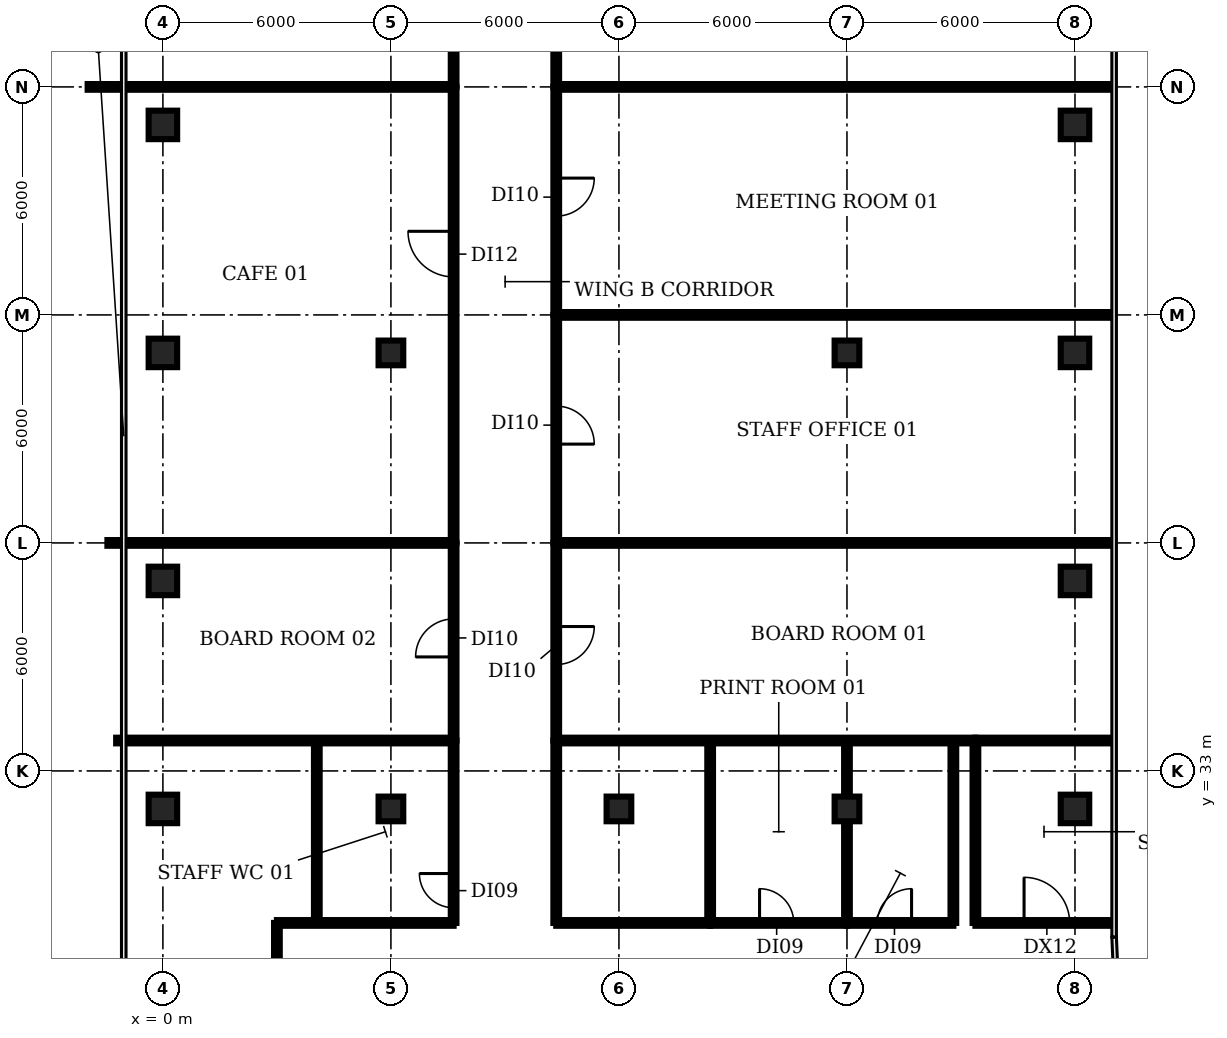
"""IFC4 building model, lengths in metres.
Left out: names, types, materials, properties, quantities, classifications, styles, units other than length and angle.
Written with IfcOpenShell. Run it as: python <this file> out.ifc"""

import sys

from ifc_helpers import new_model, si_unit, direction, frame, frame_2d, origin, origin_2d, place, context, subcontext, project, spatial, rectangle, extrude, element, fill, save


model = new_model("IFC4")
c1 = context("Model", 3, precision=1e-05, world=origin(), true_north=direction((0.0, 1.0)))
c2 = subcontext(c1, "Body", "Model", "MODEL_VIEW")
j1 = project(units=[si_unit("LENGTHUNIT", "METRE"), si_unit("PLANEANGLEUNIT", "RADIAN")], contexts=[c1])
p1 = place(None, origin())
s1 = spatial("IfcSite", under=j1, at=p1, CompositionType="ELEMENT")
p2 = place(p1, origin())
s2 = spatial("IfcBuilding", under=s1, at=p2, CompositionType="ELEMENT")
p3 = place(p2, frame((0.0, 0.0, 297.8)))
s3 = spatial("IfcBuildingStorey", under=s2, at=p3, CompositionType="ELEMENT", Elevation=297.8)
for number, where, z_axis, x_axis in (
    (1, (0.0, 32.0, 0.0), (0.0, 0.0, 1.0), (1.0, 0.0, 0.0)),
    (2, (0.0, 38.0, 0.0), (0.0, 0.0, 1.0), (1.0, 0.0, 0.0)),
    (3, (0.0, 44.0, 0.0), (0.0, 0.0, 1.0), (1.0, 0.0, 0.0)),
    (4, (0.0, 50.0, 0.0), (0.0, 0.0, 1.0), (1.0, 0.0, 0.0)),
):
    element("IfcColumn", number, at=place(p3, frame(where, z_axis=z_axis, x_axis=x_axis)), inside=s3, PredefinedType="COLUMN", context=c2, shape_type="SweptSolid", body=[
        extrude(rectangle(XDim=0.75, YDim=0.75, at=origin_2d()), origin(), (0.0, 0.0, 1.0), 3.85),
    ])
for number, where, z_axis, x_axis in (
    (5, (6.0, 32.0, 0.0), (0.0, 0.0, 1.0), (1.0, 0.0, 0.0)),
    (6, (6.0, 44.0, 0.0), (0.0, 0.0, 1.0), (1.0, 0.0, 0.0)),
    (7, (12.0, 32.0, 0.0), (0.0, 0.0, 1.0), (1.0, 0.0, 0.0)),
    (8, (18.0, 32.0, 0.0), (0.0, 0.0, 1.0), (1.0, 0.0, 0.0)),
    (9, (18.0, 44.0, 0.0), (0.0, 0.0, 1.0), (1.0, 0.0, 0.0)),
):
    element("IfcColumn", number, at=place(p3, frame(where, z_axis=z_axis, x_axis=x_axis)), inside=s3, PredefinedType="COLUMN", context=c2, shape_type="SweptSolid", body=[
        extrude(rectangle(XDim=0.65, YDim=0.65, at=origin_2d()), origin(), (0.0, 0.0, 1.0), 3.85),
    ])
for number, where, z_axis, x_axis in (
    (10, (24.0, 32.0, 0.0), (0.0, 0.0, 1.0), (1.0, 0.0, 0.0)),
    (11, (24.0, 38.0, 0.0), (0.0, 0.0, 1.0), (1.0, 0.0, 0.0)),
    (12, (24.0, 44.0, 0.0), (0.0, 0.0, 1.0), (1.0, 0.0, 0.0)),
    (13, (24.0, 50.0, 0.0), (0.0, 0.0, 1.0), (1.0, 0.0, 0.0)),
):
    element("IfcColumn", number, at=place(p3, frame(where, z_axis=z_axis, x_axis=x_axis)), inside=s3, PredefinedType="COLUMN", context=c2, shape_type="SweptSolid", body=[
        extrude(rectangle(XDim=0.75, YDim=0.75, at=origin_2d()), origin(), (0.0, 0.0, 1.0), 3.85),
    ])
p4 = place(p3, frame((-1.98, 51.0, 0.0), z_axis=(0.0, 0.0, 1.0), x_axis=(1.0, 0.0, 0.0)))
e14 = element("IfcWall", 14, at=p4, inside=s3, PredefinedType="PARTITIONING", context=c2, shape_type="SweptSolid", body=[
    extrude(rectangle(XDim=9.63, YDim=0.15, at=frame_2d((4.815, 0.0))), origin(), (0.0, 0.0, 1.0), 2.9),
])
p5 = place(p3, frame((-1.46, 39.0, 0.0), z_axis=(0.0, 0.0, 1.0), x_axis=(1.0, 0.0, 0.0)))
e15 = element("IfcWall", 15, at=p5, inside=s3, PredefinedType="PARTITIONING", context=c2, shape_type="SweptSolid", body=[
    extrude(rectangle(XDim=9.11, YDim=0.15, at=frame_2d((4.555, 0.0))), origin(), (0.0, 0.0, 1.0), 2.9),
])
p6 = place(p3, frame((-1.23, 33.8, 0.0), z_axis=(0.0, 0.0, 1.0), x_axis=(1.0, 0.0, 0.0)))
e16 = element("IfcWall", 16, at=p6, inside=s3, PredefinedType="PARTITIONING", context=c2, shape_type="SweptSolid", body=[
    extrude(rectangle(XDim=8.88, YDim=0.15, at=frame_2d((4.44, 0.0))), origin(), (0.0, 0.0, 1.0), 2.9),
])
p7 = place(p3, frame((3.0, 25.1, 0.0), z_axis=(0.0, 0.0, 1.0), x_axis=(0.0, 1.0, 0.0)))
e17 = element("IfcWall", 17, at=p7, inside=s3, PredefinedType="PARTITIONING", context=c2, shape_type="SweptSolid", body=[
    extrude(rectangle(XDim=3.9, YDim=0.15, at=frame_2d((1.95, 0.0))), origin(), (0.0, 0.0, 1.0), 2.9),
])
p8 = place(p3, frame((3.0, 29.0, 0.0), z_axis=(0.0, 0.0, 1.0), x_axis=(1.0, 0.0, 0.0)))
e18 = element("IfcWall", 18, at=p8, inside=s3, PredefinedType="PARTITIONING", context=c2, shape_type="SweptSolid", body=[
    extrude(rectangle(XDim=4.65, YDim=0.15, at=frame_2d((2.325, 0.0))), origin(), (0.0, 0.0, 1.0), 2.9),
])
p9 = place(p3, frame((4.05, 29.0, 0.0), z_axis=(0.0, 0.0, 1.0), x_axis=(0.0, 1.0, 0.0)))
e19 = element("IfcWall", 19, at=p9, inside=s3, PredefinedType="PARTITIONING", context=c2, shape_type="SweptSolid", body=[
    extrude(rectangle(XDim=4.8, YDim=0.15, at=frame_2d((2.4, 0.0))), origin(), (0.0, 0.0, 1.0), 2.9),
])
p10 = place(p3, frame((7.65, 29.0, 0.0), z_axis=(0.0, 0.0, 1.0), x_axis=(0.0, 1.0, 0.0)))
e20 = element("IfcWall", 20, at=p10, inside=s3, PredefinedType="PARTITIONING", context=c2, shape_type="SweptSolid", body=[
    extrude(rectangle(XDim=4.8, YDim=0.15, at=frame_2d((2.4, 0.0))), origin(), (0.0, 0.0, 1.0), 2.9),
])
p11 = place(p10, frame((0.4, 0.0, 0.0)))
e21 = element("IfcOpeningElement", 21, at=p11, cuts=e20, PredefinedType="OPENING", context=c2, shape_type="SweptSolid", body=[
    extrude(rectangle(XDim=0.9, YDim=2.1, at=frame_2d((0.45, 1.05))), frame((0.0, 0.085, 0.0), z_axis=(0.0, -1.0, 0.0), x_axis=(1.0, 0.0, 0.0)), (0.0, 0.0, 1.0), 0.17),
])
p12 = place(p3, frame((7.65, 33.8, 0.0), z_axis=(0.0, 0.0, 1.0), x_axis=(0.0, 1.0, 0.0)))
e22 = element("IfcWall", 22, at=p12, inside=s3, PredefinedType="PARTITIONING", context=c2, shape_type="SweptSolid", body=[
    extrude(rectangle(XDim=5.2, YDim=0.15, at=frame_2d((2.6, 0.0))), origin(), (0.0, 0.0, 1.0), 2.9),
])
p13 = place(p12, frame((2.2, 0.0, 0.0)))
e23 = element("IfcOpeningElement", 23, at=p13, cuts=e22, PredefinedType="OPENING", context=c2, shape_type="SweptSolid", body=[
    extrude(rectangle(XDim=1.0, YDim=2.1, at=frame_2d((0.5, 1.05))), frame((0.0, 0.085, 0.0), z_axis=(0.0, -1.0, 0.0), x_axis=(1.0, 0.0, 0.0)), (0.0, 0.0, 1.0), 0.17),
])
p14 = place(p3, frame((7.65, 39.0, 0.0), z_axis=(0.0, 0.0, 1.0), x_axis=(0.0, 1.0, 0.0)))
e24 = element("IfcWall", 24, at=p14, inside=s3, PredefinedType="PARTITIONING", context=c2, shape_type="SweptSolid", body=[
    extrude(rectangle(XDim=12.0, YDim=0.15, at=frame_2d((6.0, 0.0))), origin(), (0.0, 0.0, 1.0), 2.9),
])
p15 = place(p14, frame((7.0, 0.0, 0.0)))
e25 = element("IfcOpeningElement", 25, at=p15, cuts=e24, PredefinedType="OPENING", context=c2, shape_type="SweptSolid", body=[
    extrude(rectangle(XDim=1.2, YDim=2.1, at=frame_2d((0.6, 1.05))), frame((0.0, 0.085, 0.0), z_axis=(0.0, -1.0, 0.0), x_axis=(1.0, 0.0, 0.0)), (0.0, 0.0, 1.0), 0.17),
])
p16 = place(p3, frame((7.65, 51.0, 0.0), z_axis=(0.0, 0.0, 1.0), x_axis=(0.0, 1.0, 0.0)))
e26 = element("IfcWall", 26, at=p16, inside=s3, PredefinedType="PARTITIONING", context=c2, shape_type="SweptSolid", body=[
    extrude(rectangle(XDim=6.0, YDim=0.15, at=frame_2d((3.0, 0.0))), origin(), (0.0, 0.0, 1.0), 2.9),
])
p17 = place(p16, frame((1.8, 0.0, 0.0)))
e27 = element("IfcOpeningElement", 27, at=p17, cuts=e26, PredefinedType="OPENING", context=c2, shape_type="SweptSolid", body=[
    extrude(rectangle(XDim=1.0, YDim=2.1, at=frame_2d((0.5, 1.05))), frame((0.0, 0.085, 0.0), z_axis=(0.0, -1.0, 0.0), x_axis=(1.0, 0.0, 0.0)), (0.0, 0.0, 1.0), 0.17),
])
p18 = place(p3, frame((10.35, 29.0, 0.0), z_axis=(0.0, 0.0, 1.0), x_axis=(0.0, 1.0, 0.0)))
e28 = element("IfcWall", 28, at=p18, inside=s3, PredefinedType="PARTITIONING", context=c2, shape_type="SweptSolid", body=[
    extrude(rectangle(XDim=4.8, YDim=0.15, at=frame_2d((2.4, 0.0))), origin(), (0.0, 0.0, 1.0), 2.9),
])
p19 = place(p3, frame((10.35, 29.0, 0.0), z_axis=(0.0, 0.0, 1.0), x_axis=(1.0, 0.0, 0.0)))
e29 = element("IfcWall", 29, at=p19, inside=s3, PredefinedType="PARTITIONING", context=c2, shape_type="SweptSolid", body=[
    extrude(rectangle(XDim=4.05, YDim=0.15, at=frame_2d((2.025, 0.0))), origin(), (0.0, 0.0, 1.0), 2.9),
])
p20 = place(p3, frame((10.35, 33.8, 0.0), z_axis=(0.0, 0.0, 1.0), x_axis=(1.0, 0.0, 0.0)))
e30 = element("IfcWall", 30, at=p20, inside=s3, PredefinedType="PARTITIONING", context=c2, shape_type="SweptSolid", body=[
    extrude(rectangle(XDim=11.03, YDim=0.15, at=frame_2d((5.515, 0.0))), origin(), (0.0, 0.0, 1.0), 2.9),
])
p21 = place(p3, frame((10.35, 39.0, 0.0), z_axis=(0.0, 0.0, 1.0), x_axis=(0.0, -1.0, 0.0)))
e31 = element("IfcWall", 31, at=p21, inside=s3, PredefinedType="PARTITIONING", context=c2, shape_type="SweptSolid", body=[
    extrude(rectangle(XDim=5.2, YDim=0.15, at=frame_2d((2.6, 0.0))), origin(), (0.0, 0.0, 1.0), 2.9),
])
p22 = place(p21, frame((2.2, 0.0, 0.0)))
e32 = element("IfcOpeningElement", 32, at=p22, cuts=e31, PredefinedType="OPENING", context=c2, shape_type="SweptSolid", body=[
    extrude(rectangle(XDim=1.0, YDim=2.1, at=frame_2d((0.5, 1.05))), frame((0.0, 0.085, 0.0), z_axis=(0.0, -1.0, 0.0), x_axis=(1.0, 0.0, 0.0)), (0.0, 0.0, 1.0), 0.17),
])
p23 = place(p3, frame((10.35, 39.0, 0.0), z_axis=(0.0, 0.0, 1.0), x_axis=(1.0, 0.0, 0.0)))
e33 = element("IfcWall", 33, at=p23, inside=s3, PredefinedType="PARTITIONING", context=c2, shape_type="SweptSolid", body=[
    extrude(rectangle(XDim=14.63, YDim=0.15, at=frame_2d((7.315, 0.0))), origin(), (0.0, 0.0, 1.0), 2.9),
])
p24 = place(p3, frame((10.35, 45.0, 0.0), z_axis=(0.0, 0.0, 1.0), x_axis=(0.0, -1.0, 0.0)))
e34 = element("IfcWall", 34, at=p24, inside=s3, PredefinedType="PARTITIONING", context=c2, shape_type="SweptSolid", body=[
    extrude(rectangle(XDim=6.0, YDim=0.15, at=frame_2d((3.0, 0.0))), origin(), (0.0, 0.0, 1.0), 2.9),
])
p25 = place(p24, frame((2.4, 0.0, 0.0)))
e35 = element("IfcOpeningElement", 35, at=p25, cuts=e34, PredefinedType="OPENING", context=c2, shape_type="SweptSolid", body=[
    extrude(rectangle(XDim=1.0, YDim=2.1, at=frame_2d((0.5, 1.05))), frame((0.0, 0.085, 0.0), z_axis=(0.0, -1.0, 0.0), x_axis=(1.0, 0.0, 0.0)), (0.0, 0.0, 1.0), 0.17),
])
p26 = place(p3, frame((10.35, 45.0, 0.0), z_axis=(0.0, 0.0, 1.0), x_axis=(1.0, 0.0, 0.0)))
e36 = element("IfcWall", 36, at=p26, inside=s3, PredefinedType="PARTITIONING", context=c2, shape_type="SweptSolid", body=[
    extrude(rectangle(XDim=14.63, YDim=0.15, at=frame_2d((7.315, 0.0))), origin(), (0.0, 0.0, 1.0), 2.9),
])
p27 = place(p3, frame((10.35, 51.0, 0.0), z_axis=(0.0, 0.0, 1.0), x_axis=(0.0, -1.0, 0.0)))
e37 = element("IfcWall", 37, at=p27, inside=s3, PredefinedType="PARTITIONING", context=c2, shape_type="SweptSolid", body=[
    extrude(rectangle(XDim=6.0, YDim=0.15, at=frame_2d((3.0, 0.0))), origin(), (0.0, 0.0, 1.0), 2.9),
])
p28 = place(p27, frame((2.4, 0.0, 0.0)))
e38 = element("IfcOpeningElement", 38, at=p28, cuts=e37, PredefinedType="OPENING", context=c2, shape_type="SweptSolid", body=[
    extrude(rectangle(XDim=1.0, YDim=2.1, at=frame_2d((0.5, 1.05))), frame((0.0, 0.085, 0.0), z_axis=(0.0, -1.0, 0.0), x_axis=(1.0, 0.0, 0.0)), (0.0, 0.0, 1.0), 0.17),
])
p29 = place(p3, frame((10.35, 51.0, 0.0), z_axis=(0.0, 0.0, 1.0), x_axis=(1.0, 0.0, 0.0)))
e39 = element("IfcWall", 39, at=p29, inside=s3, PredefinedType="PARTITIONING", context=c2, shape_type="SweptSolid", body=[
    extrude(rectangle(XDim=14.63, YDim=0.15, at=frame_2d((7.315, 0.0))), origin(), (0.0, 0.0, 1.0), 2.9),
])
p30 = place(p3, frame((10.35, 63.09, 0.0), z_axis=(0.0, 0.0, 1.0), x_axis=(0.0, -1.0, 0.0)))
e40 = element("IfcWall", 40, at=p30, inside=s3, PredefinedType="PARTITIONING", context=c2, shape_type="SweptSolid", body=[
    extrude(rectangle(XDim=12.09, YDim=0.15, at=frame_2d((6.045, 0.0))), origin(), (0.0, 0.0, 1.0), 2.9),
])
p31 = place(p30, frame((5.59, 0.0, 0.0)))
e41 = element("IfcOpeningElement", 41, at=p31, cuts=e40, PredefinedType="OPENING", context=c2, shape_type="SweptSolid", body=[
    extrude(rectangle(XDim=1.2, YDim=2.1, at=frame_2d((0.6, 1.05))), frame((0.0, 0.085, 0.0), z_axis=(0.0, -1.0, 0.0), x_axis=(1.0, 0.0, 0.0)), (0.0, 0.0, 1.0), 0.17),
])
p32 = place(p3, frame((14.4, 29.0, 0.0), z_axis=(0.0, 0.0, 1.0), x_axis=(0.0, 1.0, 0.0)))
e42 = element("IfcWall", 42, at=p32, inside=s3, PredefinedType="PARTITIONING", context=c2, shape_type="SweptSolid", body=[
    extrude(rectangle(XDim=4.8, YDim=0.15, at=frame_2d((2.4, 0.0))), origin(), (0.0, 0.0, 1.0), 2.9),
])
p33 = place(p3, frame((14.4, 29.0, 0.0), z_axis=(0.0, 0.0, 1.0), x_axis=(1.0, 0.0, 0.0)))
e43 = element("IfcWall", 43, at=p33, inside=s3, PredefinedType="PARTITIONING", context=c2, shape_type="SweptSolid", body=[
    extrude(rectangle(XDim=3.6, YDim=0.15, at=frame_2d((1.8, 0.0))), origin(), (0.0, 0.0, 1.0), 2.9),
])
p34 = place(p33, frame((1.3, 0.0, 0.0)))
e44 = element("IfcOpeningElement", 44, at=p34, cuts=e43, PredefinedType="OPENING", context=c2, shape_type="SweptSolid", body=[
    extrude(rectangle(XDim=0.9, YDim=2.1, at=frame_2d((0.45, 1.05))), frame((0.0, 0.085, 0.0), z_axis=(0.0, -1.0, 0.0), x_axis=(1.0, 0.0, 0.0)), (0.0, 0.0, 1.0), 0.17),
])
p35 = place(p3, frame((18.0, 29.0, 0.0), z_axis=(0.0, 0.0, 1.0), x_axis=(0.0, 1.0, 0.0)))
e45 = element("IfcWall", 45, at=p35, inside=s3, PredefinedType="PARTITIONING", context=c2, shape_type="SweptSolid", body=[
    extrude(rectangle(XDim=4.8, YDim=0.15, at=frame_2d((2.4, 0.0))), origin(), (0.0, 0.0, 1.0), 2.9),
])
p36 = place(p3, frame((18.0, 29.0, 0.0), z_axis=(0.0, 0.0, 1.0), x_axis=(1.0, 0.0, 0.0)))
e46 = element("IfcWall", 46, at=p36, inside=s3, PredefinedType="PARTITIONING", context=c2, shape_type="SweptSolid", body=[
    extrude(rectangle(XDim=2.8, YDim=0.15, at=frame_2d((1.4, 0.0))), origin(), (0.0, 0.0, 1.0), 2.9),
])
p37 = place(p36, frame((0.8, 0.0, 0.0)))
e47 = element("IfcOpeningElement", 47, at=p37, cuts=e46, PredefinedType="OPENING", context=c2, shape_type="SweptSolid", body=[
    extrude(rectangle(XDim=0.9, YDim=2.1, at=frame_2d((0.45, 1.05))), frame((0.0, 0.085, 0.0), z_axis=(0.0, -1.0, 0.0), x_axis=(1.0, 0.0, 0.0)), (0.0, 0.0, 1.0), 0.17),
])
for number, where, z_axis, x_axis in (
    (48, (20.8, 29.0, 0.0), (0.0, 0.0, 1.0), (0.0, 1.0, 0.0)),
    (49, (21.38, 29.0, 0.0), (0.0, 0.0, 1.0), (0.0, 1.0, 0.0)),
):
    element("IfcWall", number, at=place(p3, frame(where, z_axis=z_axis, x_axis=x_axis)), inside=s3, PredefinedType="PARTITIONING", context=c2, shape_type="SweptSolid", body=[
        extrude(rectangle(XDim=4.8, YDim=0.15, at=frame_2d((2.4, 0.0))), origin(), (0.0, 0.0, 1.0), 2.9),
    ])
p38 = place(p3, frame((21.38, 29.0, 0.0), z_axis=(0.0, 0.0, 1.0), x_axis=(1.0, 0.0, 0.0)))
e50 = element("IfcWall", 50, at=p38, inside=s3, PredefinedType="PARTITIONING", context=c2, shape_type="SweptSolid", body=[
    extrude(rectangle(XDim=3.58, YDim=0.15, at=frame_2d((1.79, 0.0))), origin(), (0.0, 0.0, 1.0), 2.9),
])
p39 = place(p38, frame((1.28, 0.0, 0.0)))
e51 = element("IfcOpeningElement", 51, at=p39, cuts=e50, PredefinedType="OPENING", context=c2, shape_type="SweptSolid", body=[
    extrude(rectangle(XDim=1.2, YDim=2.1, at=frame_2d((0.6, 1.05))), frame((0.0, 0.085, 0.0), z_axis=(0.0, -1.0, 0.0), x_axis=(1.0, 0.0, 0.0)), (0.0, 0.0, 1.0), 0.17),
])
p40 = place(p3, frame((21.38, 33.8, 0.0), z_axis=(0.0, 0.0, 1.0), x_axis=(1.0, 0.0, 0.0)))
e52 = element("IfcWall", 52, at=p40, inside=s3, PredefinedType="PARTITIONING", context=c2, shape_type="SweptSolid", body=[
    extrude(rectangle(XDim=3.6, YDim=0.15, at=frame_2d((1.8, 0.0))), origin(), (0.0, 0.0, 1.0), 2.9),
])
p41 = place(p11, origin())
e53 = element("IfcDoor", 53, at=p41, inside=s3, OperationType="SINGLE_SWING_RIGHT", PredefinedType="DOOR", context=c2, shape_type="SweptSolid", body=[
    extrude(rectangle(XDim=0.9, YDim=2.1, at=frame_2d((0.45, 1.05))), frame((0.0, 0.025, 0.0), z_axis=(0.0, -1.0, 0.0), x_axis=(1.0, 0.0, 0.0)), (0.0, 0.0, 1.0), 0.05),
])
fill(e21, e53)
p42 = place(p13, origin())
e54 = element("IfcDoor", 54, at=p42, inside=s3, OperationType="SINGLE_SWING_LEFT", PredefinedType="DOOR", context=c2, shape_type="SweptSolid", body=[
    extrude(rectangle(XDim=1.0, YDim=2.1, at=frame_2d((0.5, 1.05))), frame((0.0, 0.025, 0.0), z_axis=(0.0, -1.0, 0.0), x_axis=(1.0, 0.0, 0.0)), (0.0, 0.0, 1.0), 0.05),
])
fill(e23, e54)
p43 = place(p15, origin())
e55 = element("IfcDoor", 55, at=p43, inside=s3, OperationType="SINGLE_SWING_RIGHT", PredefinedType="DOOR", context=c2, shape_type="SweptSolid", body=[
    extrude(rectangle(XDim=1.2, YDim=2.1, at=frame_2d((0.6, 1.05))), frame((0.0, 0.025, 0.0), z_axis=(0.0, -1.0, 0.0), x_axis=(1.0, 0.0, 0.0)), (0.0, 0.0, 1.0), 0.05),
])
fill(e25, e55)
p44 = place(p22, origin())
e56 = element("IfcDoor", 56, at=p44, inside=s3, OperationType="SINGLE_SWING_LEFT", PredefinedType="DOOR", context=c2, shape_type="SweptSolid", body=[
    extrude(rectangle(XDim=1.0, YDim=2.1, at=frame_2d((0.5, 1.05))), frame((0.0, 0.025, 0.0), z_axis=(0.0, -1.0, 0.0), x_axis=(1.0, 0.0, 0.0)), (0.0, 0.0, 1.0), 0.05),
])
fill(e32, e56)
p45 = place(p25, origin())
e57 = element("IfcDoor", 57, at=p45, inside=s3, OperationType="SINGLE_SWING_RIGHT", PredefinedType="DOOR", context=c2, shape_type="SweptSolid", body=[
    extrude(rectangle(XDim=1.0, YDim=2.1, at=frame_2d((0.5, 1.05))), frame((0.0, 0.025, 0.0), z_axis=(0.0, -1.0, 0.0), x_axis=(1.0, 0.0, 0.0)), (0.0, 0.0, 1.0), 0.05),
])
fill(e35, e57)
p46 = place(p28, origin())
e58 = element("IfcDoor", 58, at=p46, inside=s3, OperationType="SINGLE_SWING_LEFT", PredefinedType="DOOR", context=c2, shape_type="SweptSolid", body=[
    extrude(rectangle(XDim=1.0, YDim=2.1, at=frame_2d((0.5, 1.05))), frame((0.0, 0.025, 0.0), z_axis=(0.0, -1.0, 0.0), x_axis=(1.0, 0.0, 0.0)), (0.0, 0.0, 1.0), 0.05),
])
fill(e38, e58)
p47 = place(p34, origin())
e59 = element("IfcDoor", 59, at=p47, inside=s3, OperationType="SINGLE_SWING_LEFT", PredefinedType="DOOR", context=c2, shape_type="SweptSolid", body=[
    extrude(rectangle(XDim=0.9, YDim=2.1, at=frame_2d((0.45, 1.05))), frame((0.0, 0.025, 0.0), z_axis=(0.0, -1.0, 0.0), x_axis=(1.0, 0.0, 0.0)), (0.0, 0.0, 1.0), 0.05),
])
fill(e44, e59)
p48 = place(p37, origin())
e60 = element("IfcDoor", 60, at=p48, inside=s3, OperationType="SINGLE_SWING_RIGHT", PredefinedType="DOOR", context=c2, shape_type="SweptSolid", body=[
    extrude(rectangle(XDim=0.9, YDim=2.1, at=frame_2d((0.45, 1.05))), frame((0.0, 0.025, 0.0), z_axis=(0.0, -1.0, 0.0), x_axis=(1.0, 0.0, 0.0)), (0.0, 0.0, 1.0), 0.05),
])
fill(e47, e60)
p49 = place(p39, origin())
e61 = element("IfcDoor", 61, at=p49, inside=s3, OperationType="SINGLE_SWING_LEFT", PredefinedType="DOOR", context=c2, shape_type="SweptSolid", body=[
    extrude(rectangle(XDim=1.2, YDim=2.1, at=frame_2d((0.6, 1.05))), frame((0.0, 0.025, 0.0), z_axis=(0.0, -1.0, 0.0), x_axis=(1.0, 0.0, 0.0)), (0.0, 0.0, 1.0), 0.05),
])
fill(e51, e61)
save(model, sys.argv[1])
